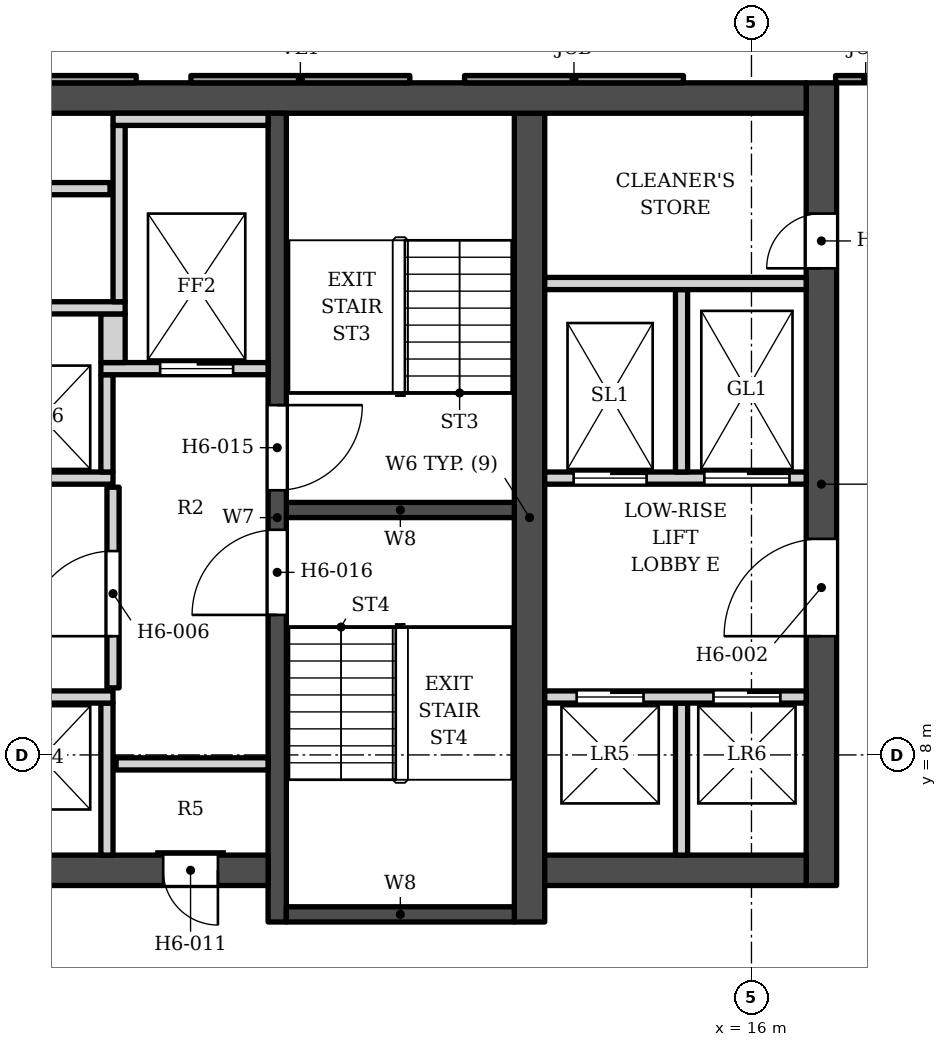
"""IFC4 building model, lengths in metres.
Left out: names, types, materials, properties, quantities, classifications, styles, units other than length and angle.
Written with IfcOpenShell. Run it as: python <this file> out.ifc"""

import sys

from ifc_helpers import new_model, si_unit, direction, frame, frame_2d, origin, place, context, subcontext, project, spatial, polyline, rectangle, outline, extrude, element, fill, save


model = new_model("IFC4")
c1 = context("Model", 3, precision=1e-05, world=origin(), true_north=direction((0.0, 1.0)))
c2 = subcontext(c1, "Body", "Model", "MODEL_VIEW")
j1 = project(units=[si_unit("LENGTHUNIT", "METRE"), si_unit("PLANEANGLEUNIT", "RADIAN")], contexts=[c1])
p1 = place(None, origin())
s1 = spatial("IfcSite", under=j1, at=p1, CompositionType="ELEMENT")
p2 = place(p1, origin())
s2 = spatial("IfcBuilding", under=s1, at=p2, CompositionType="ELEMENT")
p3 = place(p2, frame((0.0, 0.0, 102.0)))
s3 = spatial("IfcBuildingStorey", under=s2, at=p3, CompositionType="ELEMENT", Elevation=102.0)
p4 = place(p3, frame((-16.9, 18.802, 0.0), z_axis=(0.0, 0.0, 1.0), x_axis=(1.0, 0.0, 0.0)))
e1 = element("IfcWall", 1, at=p4, inside=s3, PredefinedType="SHEAR", context=c2, shape_type="SweptSolid", body=[
    extrude(rectangle(XDim=33.8, YDim=0.5, at=frame_2d((16.9, 0.0))), origin(), (0.0, 0.0, 1.0), 3.4),
])
p5 = place(p3, frame((12.35, 5.253, 0.0), z_axis=(0.0, 0.0, 1.0), x_axis=(0.0, 1.0, 0.0)))
e2 = element("IfcWall", 2, at=p5, inside=s3, PredefinedType="SHEAR", context=c2, shape_type="SweptSolid", body=[
    extrude(rectangle(XDim=13.3, YDim=0.5, at=frame_2d((6.65, 0.0))), origin(), (0.0, 0.0, 1.0), 3.4),
])
p6 = place(p3, frame((8.2, 5.253, 0.0), z_axis=(0.0, 0.0, 1.0), x_axis=(0.0, 1.0, 0.0)))
e3 = element("IfcWall", 3, at=p6, inside=s3, PredefinedType="SHEAR", context=c2, shape_type="SweptSolid", body=[
    extrude(rectangle(XDim=13.3, YDim=0.3, at=frame_2d((6.65, 0.0))), origin(), (0.0, 0.0, 1.0), 3.4),
])
p7 = place(p6, frame((7.1, 0.0, 0.0)))
e4 = element("IfcOpeningElement", 4, at=p7, cuts=e3, PredefinedType="OPENING", context=c2, shape_type="SweptSolid", body=[
    extrude(rectangle(XDim=1.4, YDim=2.1, at=frame_2d((0.7, 1.05))), frame((0.0, 0.16, 0.0), z_axis=(0.0, -1.0, 0.0), x_axis=(1.0, 0.0, 0.0)), (0.0, 0.0, 1.0), 0.32),
])
p8 = place(p6, frame((5.05, 0.0, 0.0)))
e5 = element("IfcOpeningElement", 5, at=p8, cuts=e3, PredefinedType="OPENING", context=c2, shape_type="SweptSolid", body=[
    extrude(rectangle(XDim=1.4, YDim=2.1, at=frame_2d((0.7, 1.05))), frame((0.0, 0.16, 0.0), z_axis=(0.0, -1.0, 0.0), x_axis=(1.0, 0.0, 0.0)), (0.0, 0.0, 1.0), 0.32),
])
for number, where, z_axis, x_axis in (
    (6, (8.35, 12.028, 0.0), (0.0, 0.0, 1.0), (1.0, 0.0, 0.0)),
    (7, (8.35, 5.378, 0.0), (0.0, 0.0, 1.0), (1.0, 0.0, 0.0)),
):
    element("IfcWall", number, at=place(p3, frame(where, z_axis=z_axis, x_axis=x_axis)), inside=s3, PredefinedType="SHEAR", context=c2, shape_type="SweptSolid", body=[
        extrude(rectangle(XDim=3.75, YDim=0.25, at=frame_2d((1.875, 0.0))), origin(), (0.0, 0.0, 1.0), 3.4),
    ])
p9 = place(p3, frame((1.0, 6.103, 0.0), z_axis=(0.0, 0.0, 1.0), x_axis=(1.0, 0.0, 0.0)))
e8 = element("IfcWall", 8, at=p9, inside=s3, PredefinedType="SHEAR", context=c2, shape_type="SweptSolid", body=[
    extrude(rectangle(XDim=7.05, YDim=0.5, at=frame_2d((3.525, 0.0))), origin(), (0.0, 0.0, 1.0), 3.4),
])
p10 = place(p9, frame((5.325, 0.0, 0.0)))
e9 = element("IfcOpeningElement", 9, at=p10, cuts=e8, PredefinedType="OPENING", context=c2, shape_type="SweptSolid", body=[
    extrude(rectangle(XDim=0.9, YDim=2.1, at=frame_2d((0.45, 1.05))), frame((0.0, 0.26, 0.0), z_axis=(0.0, -1.0, 0.0), x_axis=(1.0, 0.0, 0.0)), (0.0, 0.0, 1.0), 0.52),
])
p11 = place(p3, frame((12.6, 6.103, 0.0), z_axis=(0.0, 0.0, 1.0), x_axis=(1.0, 0.0, 0.0)))
e10 = element("IfcWall", 10, at=p11, inside=s3, PredefinedType="SHEAR", context=c2, shape_type="SweptSolid", body=[
    extrude(rectangle(XDim=4.3, YDim=0.5, at=frame_2d((2.15, 0.0))), origin(), (0.0, 0.0, 1.0), 3.4),
])
p12 = place(p3, frame((17.15, 5.853, 0.0), z_axis=(0.0, 0.0, 1.0), x_axis=(0.0, 1.0, 0.0)))
e11 = element("IfcWall", 11, at=p12, inside=s3, PredefinedType="SHEAR", context=c2, shape_type="SweptSolid", body=[
    extrude(rectangle(XDim=13.2, YDim=0.5, at=frame_2d((6.6, 0.0))), origin(), (0.0, 0.0, 1.0), 3.4),
])
p13 = place(p12, frame((4.1, 0.0, 0.0)))
e12 = element("IfcOpeningElement", 12, at=p13, cuts=e11, PredefinedType="OPENING", context=c2, shape_type="SweptSolid", body=[
    extrude(rectangle(XDim=1.6, YDim=2.1, at=frame_2d((0.8, 1.05))), frame((0.0, 0.26, 0.0), z_axis=(0.0, -1.0, 0.0), x_axis=(1.0, 0.0, 0.0)), (0.0, 0.0, 1.0), 0.52),
])
p14 = place(p12, frame((10.15, 0.0, 0.0)))
e13 = element("IfcOpeningElement", 13, at=p14, cuts=e11, PredefinedType="OPENING", context=c2, shape_type="SweptSolid", body=[
    extrude(rectangle(XDim=0.9, YDim=2.1, at=frame_2d((0.45, 1.05))), frame((0.0, 0.26, 0.0), z_axis=(0.0, -1.0, 0.0), x_axis=(1.0, 0.0, 0.0)), (0.0, 0.0, 1.0), 0.52),
])
p15 = place(p3, origin())
e14 = element("IfcWall", 14, at=p15, inside=s3, PredefinedType="SOLIDWALL", context=c2, shape_type="SweptSolid", body=[
    extrude(outline(polyline([(11.281, 19.173), (11.281, 19.052), (14.881, 19.052), (14.881, 19.173), (11.281, 19.173)])), origin(), (0.0, 0.0, 1.0), 2.65),
])
p16 = place(p3, origin())
e15 = element("IfcWall", 15, at=p16, inside=s3, PredefinedType="ELEMENTEDWALL", context=c2, shape_type="SweptSolid", body=[
    extrude(outline(polyline([(6.781, 19.173), (6.781, 19.052), (10.381, 19.052), (10.381, 19.173), (6.781, 19.173)])), origin(), (0.0, 0.0, 1.0), 2.65),
])
p17 = place(p3, origin())
e16 = element("IfcWall", 16, at=p17, inside=s3, PredefinedType="SOLIDWALL", context=c2, shape_type="SweptSolid", body=[
    extrude(outline(polyline([(2.281, 19.173), (2.281, 19.052), (5.881, 19.052), (5.881, 19.173), (2.281, 19.173)])), origin(), (0.0, 0.0, 1.0), 2.65),
])
p18 = place(p3, frame((17.383, 19.113, 0.0), z_axis=(0.0, 0.0, 1.0), x_axis=(1.0, 0.0, 0.0)))
e17 = element("IfcWall", 17, at=p18, inside=s3, PredefinedType="SOLIDWALL", context=c2, shape_type="SweptSolid", body=[
    extrude(rectangle(XDim=0.99, YDim=0.12, at=frame_2d((0.495, 0.0))), origin(), (0.0, 0.0, 1.0), 2.65),
])
for number, where, z_axis, x_axis in (
    (18, (5.4, 6.353, 0.0), (0.0, 0.0, 1.0), (0.0, 1.0, 0.0)),
    (19, (14.85, 6.353, 0.0), (0.0, 0.0, 1.0), (0.0, 1.0, 0.0)),
    (20, (5.55, 7.853, 0.0), (0.0, 0.0, 1.0), (1.0, 0.0, 0.0)),
):
    element("IfcWall", number, at=place(p3, frame(where, z_axis=z_axis, x_axis=x_axis)), inside=s3, PredefinedType="SOLIDWALL", context=c2, shape_type="SweptSolid", body=[
        extrude(rectangle(XDim=2.5, YDim=0.2, at=frame_2d((1.25, 0.0))), origin(), (0.0, 0.0, 1.0), 3.23),
    ])
p19 = place(p3, frame((1.0, 8.953, 0.0), z_axis=(0.0, 0.0, 1.0), x_axis=(1.0, 0.0, 0.0)))
e21 = element("IfcWall", 21, at=p19, inside=s3, PredefinedType="SOLIDWALL", context=c2, shape_type="SweptSolid", body=[
    extrude(rectangle(XDim=4.5, YDim=0.2, at=frame_2d((2.25, 0.0))), origin(), (0.0, 0.0, 1.0), 3.23),
])
p20 = place(p3, frame((12.6, 8.953, 0.0), z_axis=(0.0, 0.0, 1.0), x_axis=(1.0, 0.0, 0.0)))
e22 = element("IfcWall", 22, at=p20, inside=s3, PredefinedType="SOLIDWALL", context=c2, shape_type="SweptSolid", body=[
    extrude(rectangle(XDim=4.3, YDim=0.2, at=frame_2d((2.15, 0.0))), origin(), (0.0, 0.0, 1.0), 3.23),
])
p21 = place(p20, frame((0.525, 0.0, 0.0)))
e23 = element("IfcOpeningElement", 23, at=p21, cuts=e22, PredefinedType="OPENING", context=c2, shape_type="SweptSolid", body=[
    extrude(rectangle(XDim=1.1, YDim=2.1, at=frame_2d((0.55, 1.05))), frame((0.0, 0.11, 0.0), z_axis=(0.0, -1.0, 0.0), x_axis=(1.0, 0.0, 0.0)), (0.0, 0.0, 1.0), 0.22),
])
p22 = place(p20, frame((2.775, 0.0, 0.0)))
e24 = element("IfcOpeningElement", 24, at=p22, cuts=e22, PredefinedType="OPENING", context=c2, shape_type="SweptSolid", body=[
    extrude(rectangle(XDim=1.1, YDim=2.1, at=frame_2d((0.55, 1.05))), frame((0.0, 0.11, 0.0), z_axis=(0.0, -1.0, 0.0), x_axis=(1.0, 0.0, 0.0)), (0.0, 0.0, 1.0), 0.22),
])
p23 = place(p3, frame((5.5, 9.103, 0.0), z_axis=(0.0, 0.0, 1.0), x_axis=(0.0, 1.0, 0.0)))
e25 = element("IfcWall", 25, at=p23, inside=s3, PredefinedType="SOLIDWALL", context=c2, shape_type="SweptSolid", body=[
    extrude(rectangle(XDim=3.3, YDim=0.2, at=frame_2d((1.65, 0.0))), origin(), (0.0, 0.0, 1.0), 3.23),
])
p24 = place(p23, frame((0.85, 0.0, 0.0)))
e26 = element("IfcOpeningElement", 26, at=p24, cuts=e25, PredefinedType="OPENING", context=c2, shape_type="SweptSolid", body=[
    extrude(rectangle(XDim=1.4, YDim=2.1, at=frame_2d((0.7, 1.05))), frame((0.0, 0.11, 0.0), z_axis=(0.0, -1.0, 0.0), x_axis=(1.0, 0.0, 0.0)), (0.0, 0.0, 1.0), 0.22),
])
p25 = place(p3, frame((-1.5, 12.552, 0.0), z_axis=(0.0, 0.0, 1.0), x_axis=(1.0, 0.0, 0.0)))
e27 = element("IfcWall", 27, at=p25, inside=s3, PredefinedType="SOLIDWALL", context=c2, shape_type="SweptSolid", body=[
    extrude(rectangle(XDim=7.0, YDim=0.2, at=frame_2d((3.5, 0.0))), origin(), (0.0, 0.0, 1.0), 3.23),
])
p26 = place(p3, frame((12.6, 12.552, 0.0), z_axis=(0.0, 0.0, 1.0), x_axis=(1.0, 0.0, 0.0)))
e28 = element("IfcWall", 28, at=p26, inside=s3, PredefinedType="SOLIDWALL", context=c2, shape_type="SweptSolid", body=[
    extrude(rectangle(XDim=4.3, YDim=0.2, at=frame_2d((2.15, 0.0))), origin(), (0.0, 0.0, 1.0), 3.23),
])
p27 = place(p26, frame((0.475, 0.0, 0.0)))
e29 = element("IfcOpeningElement", 29, at=p27, cuts=e28, PredefinedType="OPENING", context=c2, shape_type="SweptSolid", body=[
    extrude(rectangle(XDim=1.2, YDim=2.1, at=frame_2d((0.6, 1.05))), frame((0.0, 0.11, 0.0), z_axis=(0.0, -1.0, 0.0), x_axis=(1.0, 0.0, 0.0)), (0.0, 0.0, 1.0), 0.22),
])
p28 = place(p26, frame((2.625, 0.0, 0.0)))
e30 = element("IfcOpeningElement", 30, at=p28, cuts=e28, PredefinedType="OPENING", context=c2, shape_type="SweptSolid", body=[
    extrude(rectangle(XDim=1.4, YDim=2.1, at=frame_2d((0.7, 1.05))), frame((0.0, 0.11, 0.0), z_axis=(0.0, -1.0, 0.0), x_axis=(1.0, 0.0, 0.0)), (0.0, 0.0, 1.0), 0.22),
])
p29 = place(p3, frame((5.4, 12.653, 0.0), z_axis=(0.0, 0.0, 1.0), x_axis=(0.0, 1.0, 0.0)))
e31 = element("IfcWall", 31, at=p29, inside=s3, PredefinedType="SOLIDWALL", context=c2, shape_type="SweptSolid", body=[
    extrude(rectangle(XDim=1.6, YDim=0.2, at=frame_2d((0.8, 0.0))), origin(), (0.0, 0.0, 1.0), 3.23),
])
p30 = place(p3, frame((14.85, 12.653, 0.0), z_axis=(0.0, 0.0, 1.0), x_axis=(0.0, 1.0, 0.0)))
e32 = element("IfcWall", 32, at=p30, inside=s3, PredefinedType="SOLIDWALL", context=c2, shape_type="SweptSolid", body=[
    extrude(rectangle(XDim=3.0, YDim=0.2, at=frame_2d((1.5, 0.0))), origin(), (0.0, 0.0, 1.0), 3.23),
])
p31 = place(p3, frame((5.3, 14.353, 0.0), z_axis=(0.0, 0.0, 1.0), x_axis=(1.0, 0.0, 0.0)))
e33 = element("IfcWall", 33, at=p31, inside=s3, PredefinedType="SOLIDWALL", context=c2, shape_type="SweptSolid", body=[
    extrude(rectangle(XDim=2.75, YDim=0.2, at=frame_2d((1.375, 0.0))), origin(), (0.0, 0.0, 1.0), 3.23),
])
p32 = place(p31, frame((0.975, 0.0, 0.0)))
e34 = element("IfcOpeningElement", 34, at=p32, cuts=e33, PredefinedType="OPENING", context=c2, shape_type="SweptSolid", body=[
    extrude(rectangle(XDim=1.2, YDim=2.1, at=frame_2d((0.6, 1.05))), frame((0.0, 0.11, 0.0), z_axis=(0.0, -1.0, 0.0), x_axis=(1.0, 0.0, 0.0)), (0.0, 0.0, 1.0), 0.22),
])
p33 = place(p3, frame((5.5, 14.453, 0.0), z_axis=(0.0, 0.0, 1.0), x_axis=(0.0, 1.0, 0.0)))
e35 = element("IfcWall", 35, at=p33, inside=s3, PredefinedType="SOLIDWALL", context=c2, shape_type="SweptSolid", body=[
    extrude(rectangle(XDim=0.8, YDim=0.4, at=frame_2d((0.4, 0.0))), origin(), (0.0, 0.0, 1.0), 3.23),
])
p34 = place(p3, frame((-1.5, 15.353, 0.0), z_axis=(0.0, 0.0, 1.0), x_axis=(1.0, 0.0, 0.0)))
e36 = element("IfcWall", 36, at=p34, inside=s3, PredefinedType="SOLIDWALL", context=c2, shape_type="SweptSolid", body=[
    extrude(rectangle(XDim=7.2, YDim=0.2, at=frame_2d((3.6, 0.0))), origin(), (0.0, 0.0, 1.0), 3.23),
])
p35 = place(p3, frame((5.6, 15.453, 0.0), z_axis=(0.0, 0.0, 1.0), x_axis=(0.0, 1.0, 0.0)))
e37 = element("IfcWall", 37, at=p35, inside=s3, PredefinedType="SOLIDWALL", context=c2, shape_type="SweptSolid", body=[
    extrude(rectangle(XDim=2.9, YDim=0.2, at=frame_2d((1.45, 0.0))), origin(), (0.0, 0.0, 1.0), 3.23),
])
p36 = place(p3, frame((12.6, 15.753, 0.0), z_axis=(0.0, 0.0, 1.0), x_axis=(1.0, 0.0, 0.0)))
e38 = element("IfcWall", 38, at=p36, inside=s3, PredefinedType="SOLIDWALL", context=c2, shape_type="SweptSolid", body=[
    extrude(rectangle(XDim=4.3, YDim=0.2, at=frame_2d((2.15, 0.0))), origin(), (0.0, 0.0, 1.0), 3.23),
])
p37 = place(p3, frame((-1.4, 17.312, 0.0), z_axis=(0.0, 0.0, 1.0), x_axis=(1.0, 0.0, 0.0)))
e39 = element("IfcWall", 39, at=p37, inside=s3, PredefinedType="SOLIDWALL", context=c2, shape_type="SweptSolid", body=[
    extrude(rectangle(XDim=6.85, YDim=0.2, at=frame_2d((3.425, 0.0))), origin(), (0.0, 0.0, 1.0), 3.23),
])
p38 = place(p3, frame((5.5, 18.453, 0.0), z_axis=(0.0, 0.0, 1.0), x_axis=(1.0, 0.0, 0.0)))
e40 = element("IfcWall", 40, at=p38, inside=s3, PredefinedType="SOLIDWALL", context=c2, shape_type="SweptSolid", body=[
    extrude(rectangle(XDim=2.55, YDim=0.2, at=frame_2d((1.275, 0.0))), origin(), (0.0, 0.0, 1.0), 3.23),
])
p39 = place(p32, origin())
e41 = element("IfcDoor", 41, at=p39, inside=s3, OperationType="DOUBLE_DOOR_SLIDING", PredefinedType="DOOR", context=c2, shape_type="SweptSolid", body=[
    extrude(rectangle(XDim=1.2, YDim=2.1, at=frame_2d((0.6, 1.05))), frame((0.0, 0.025, 0.0), z_axis=(0.0, -1.0, 0.0), x_axis=(1.0, 0.0, 0.0)), (0.0, 0.0, 1.0), 0.05),
])
fill(e34, e41)
p40 = place(p21, origin())
e42 = element("IfcDoor", 42, at=p40, inside=s3, OperationType="DOUBLE_DOOR_SLIDING", PredefinedType="DOOR", context=c2, shape_type="SweptSolid", body=[
    extrude(rectangle(XDim=1.1, YDim=2.1, at=frame_2d((0.55, 1.05))), frame((0.0, 0.025, 0.0), z_axis=(0.0, -1.0, 0.0), x_axis=(1.0, 0.0, 0.0)), (0.0, 0.0, 1.0), 0.05),
])
fill(e23, e42)
p41 = place(p22, origin())
e43 = element("IfcDoor", 43, at=p41, inside=s3, OperationType="DOUBLE_DOOR_SLIDING", PredefinedType="DOOR", context=c2, shape_type="SweptSolid", body=[
    extrude(rectangle(XDim=1.1, YDim=2.1, at=frame_2d((0.55, 1.05))), frame((0.0, 0.025, 0.0), z_axis=(0.0, -1.0, 0.0), x_axis=(1.0, 0.0, 0.0)), (0.0, 0.0, 1.0), 0.05),
])
fill(e24, e43)
p42 = place(p27, origin())
e44 = element("IfcDoor", 44, at=p42, inside=s3, OperationType="DOUBLE_DOOR_SLIDING", PredefinedType="DOOR", context=c2, shape_type="SweptSolid", body=[
    extrude(rectangle(XDim=1.2, YDim=2.1, at=frame_2d((0.6, 1.05))), frame((0.0, 0.025, 0.0), z_axis=(0.0, -1.0, 0.0), x_axis=(1.0, 0.0, 0.0)), (0.0, 0.0, 1.0), 0.05),
])
fill(e29, e44)
p43 = place(p28, origin())
e45 = element("IfcDoor", 45, at=p43, inside=s3, OperationType="DOUBLE_DOOR_SLIDING", PredefinedType="DOOR", context=c2, shape_type="SweptSolid", body=[
    extrude(rectangle(XDim=1.4, YDim=2.1, at=frame_2d((0.7, 1.05))), frame((0.0, 0.025, 0.0), z_axis=(0.0, -1.0, 0.0), x_axis=(1.0, 0.0, 0.0)), (0.0, 0.0, 1.0), 0.05),
])
fill(e30, e45)
p44 = place(p7, origin())
e46 = element("IfcDoor", 46, at=p44, inside=s3, OperationType="SINGLE_SWING_RIGHT", PredefinedType="DOOR", context=c2, shape_type="SweptSolid", body=[
    extrude(rectangle(XDim=1.4, YDim=2.1, at=frame_2d((0.7, 1.05))), frame((0.0, 0.025, 0.0), z_axis=(0.0, -1.0, 0.0), x_axis=(1.0, 0.0, 0.0)), (0.0, 0.0, 1.0), 0.05),
])
fill(e4, e46)
p45 = place(p8, origin())
e47 = element("IfcDoor", 47, at=p45, inside=s3, OperationType="SINGLE_SWING_LEFT", PredefinedType="DOOR", context=c2, shape_type="SweptSolid", body=[
    extrude(rectangle(XDim=1.4, YDim=2.1, at=frame_2d((0.7, 1.05))), frame((0.0, 0.025, 0.0), z_axis=(0.0, -1.0, 0.0), x_axis=(1.0, 0.0, 0.0)), (0.0, 0.0, 1.0), 0.05),
])
fill(e5, e47)
p46 = place(p24, origin())
e48 = element("IfcDoor", 48, at=p46, inside=s3, OperationType="SINGLE_SWING_LEFT", PredefinedType="DOOR", context=c2, shape_type="SweptSolid", body=[
    extrude(rectangle(XDim=1.4, YDim=2.1, at=frame_2d((0.7, 1.05))), frame((0.0, 0.025, 0.0), z_axis=(0.0, -1.0, 0.0), x_axis=(1.0, 0.0, 0.0)), (0.0, 0.0, 1.0), 0.05),
])
fill(e26, e48)
p47 = place(p10, origin())
e49 = element("IfcDoor", 49, at=p47, inside=s3, OperationType="SINGLE_SWING_RIGHT", PredefinedType="DOOR", context=c2, shape_type="SweptSolid", body=[
    extrude(rectangle(XDim=0.9, YDim=2.1, at=frame_2d((0.45, 1.05))), frame((0.0, 0.025, 0.0), z_axis=(0.0, -1.0, 0.0), x_axis=(1.0, 0.0, 0.0)), (0.0, 0.0, 1.0), 0.05),
])
fill(e9, e49)
p48 = place(p13, origin())
e50 = element("IfcDoor", 50, at=p48, inside=s3, OperationType="DOUBLE_DOOR_SINGLE_SWING", PredefinedType="DOOR", context=c2, shape_type="SweptSolid", body=[
    extrude(rectangle(XDim=1.6, YDim=2.1, at=frame_2d((0.8, 1.05))), frame((0.0, 0.025, 0.0), z_axis=(0.0, -1.0, 0.0), x_axis=(1.0, 0.0, 0.0)), (0.0, 0.0, 1.0), 0.05),
])
fill(e12, e50)
p49 = place(p14, origin())
e51 = element("IfcDoor", 51, at=p49, inside=s3, OperationType="SINGLE_SWING_LEFT", PredefinedType="DOOR", context=c2, shape_type="SweptSolid", body=[
    extrude(rectangle(XDim=0.9, YDim=2.1, at=frame_2d((0.45, 1.05))), frame((0.0, 0.025, 0.0), z_axis=(0.0, -1.0, 0.0), x_axis=(1.0, 0.0, 0.0)), (0.0, 0.0, 1.0), 0.05),
])
fill(e13, e51)
save(model, sys.argv[1])
